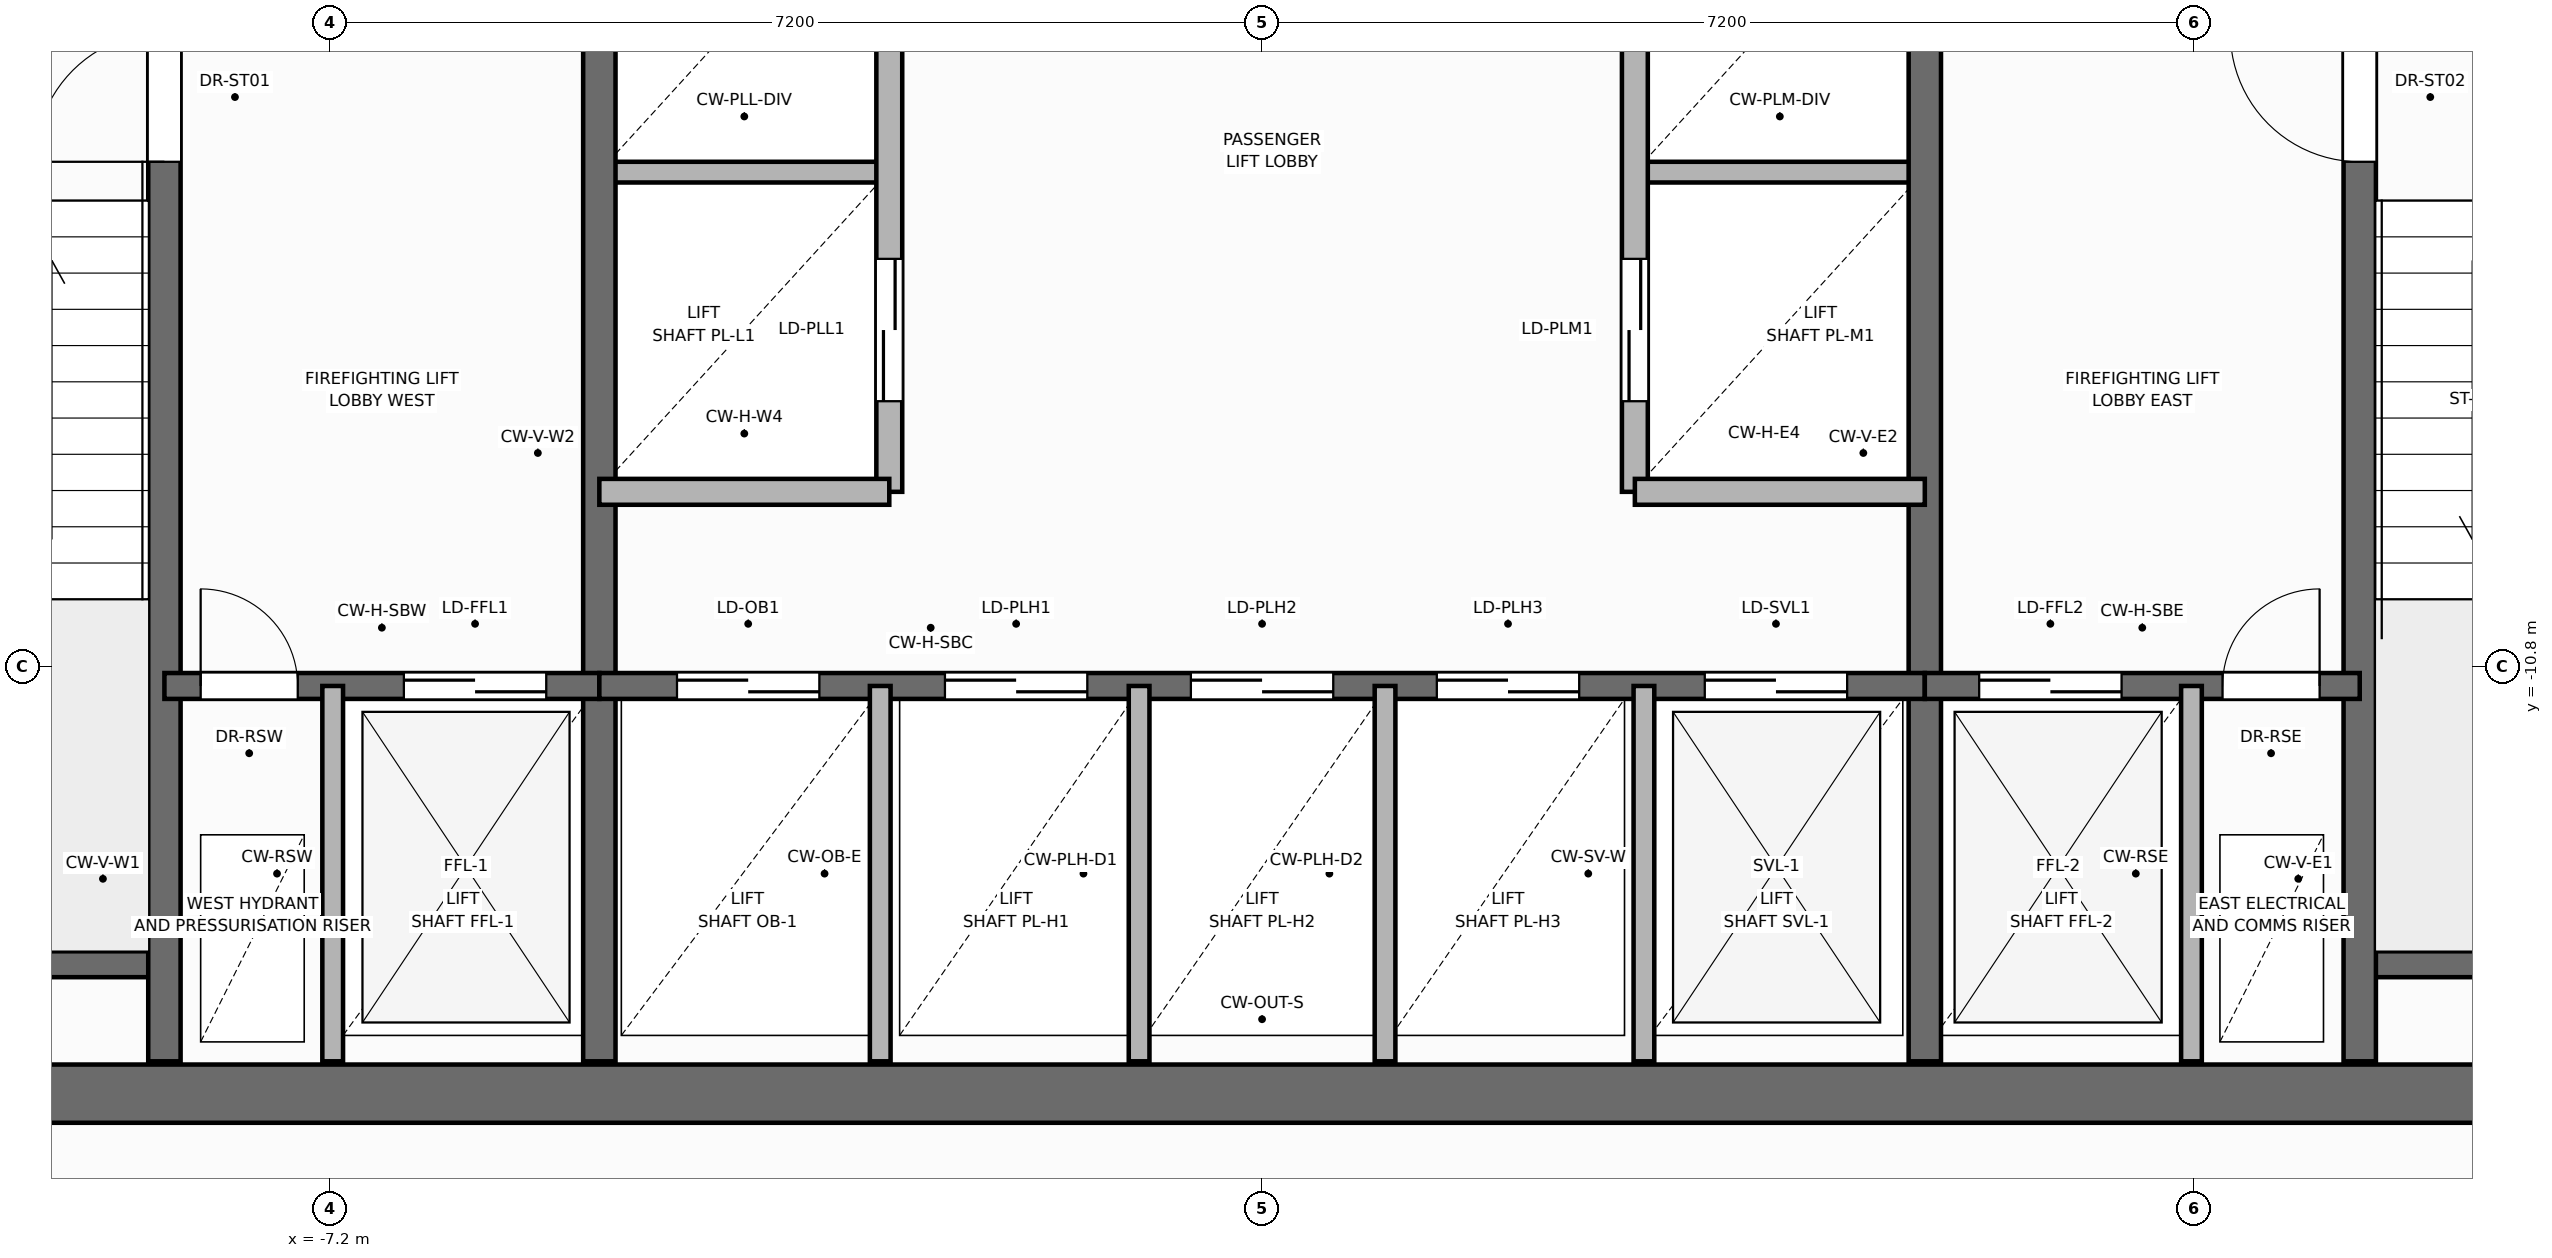
"""IFC4 building model, lengths in metres.
Left out: names, types, materials, properties, quantities, classifications, styles, units other than length and angle.
Written with IfcOpenShell. Run it as: python <this file> out.ifc"""

import sys

from ifc_helpers import new_model, si_unit, direction, frame, frame_2d, origin, place, context, subcontext, project, spatial, rectangle, extrude, element, fill, save


model = new_model("IFC4")
c1 = context("Model", 3, precision=1e-05, world=origin(), true_north=direction((0.0, 1.0)))
c2 = subcontext(c1, "Body", "Model", "MODEL_VIEW")
j1 = project(units=[si_unit("LENGTHUNIT", "METRE"), si_unit("PLANEANGLEUNIT", "RADIAN")], contexts=[c1])
p1 = place(None, origin())
s1 = spatial("IfcSite", under=j1, at=p1, CompositionType="ELEMENT")
p2 = place(p1, origin())
s2 = spatial("IfcBuilding", under=s1, at=p2, CompositionType="ELEMENT")
p3 = place(p2, frame((0.0, 0.0, 14.4)))
s3 = spatial("IfcBuildingStorey", under=s2, at=p3, CompositionType="ELEMENT", Elevation=14.4)
for number, where, z_axis, x_axis in (
    (1, (-5.12, -6.98, 0.0), (0.0, 0.0, 1.0), (1.0, 0.0, 0.0)),
    (2, (2.88, -6.98, 0.0), (0.0, 0.0, 1.0), (1.0, 0.0, 0.0)),
):
    element("IfcWall", number, at=place(p3, frame(where, z_axis=z_axis, x_axis=x_axis)), inside=s3, PredefinedType="PARTITIONING", context=c2, shape_type="SweptSolid", body=[
        extrude(rectangle(XDim=2.24, YDim=0.16, at=frame_2d((1.12, 0.0))), origin(), (0.0, 0.0, 1.0), 4.1),
    ])
p4 = place(p3, frame((-12.65, -14.1, 0.0), z_axis=(0.0, 0.0, 1.0), x_axis=(1.0, 0.0, 0.0)))
e3 = element("IfcWall", 3, at=p4, inside=s3, PredefinedType="SHEAR", context=c2, shape_type="SweptSolid", body=[
    extrude(rectangle(XDim=25.3, YDim=0.45, at=frame_2d((12.65, 0.0))), origin(), (0.0, 0.0, 1.0), 4.5),
])
for number, where, z_axis, x_axis in (
    (4, (-12.35, -13.1, 0.0), (0.0, 0.0, 1.0), (1.0, 0.0, 0.0)),
    (5, (8.48, -13.1, 0.0), (0.0, 0.0, 1.0), (1.0, 0.0, 0.0)),
):
    element("IfcWall", number, at=place(p3, frame(where, z_axis=z_axis, x_axis=x_axis)), inside=s3, PredefinedType="SOLIDWALL", context=c2, shape_type="SweptSolid", body=[
        extrude(rectangle(XDim=3.87, YDim=0.2, at=frame_2d((1.935, 0.0))), origin(), (0.0, 0.0, 1.0), 4.5),
    ])
p5 = place(p3, frame((-8.48, -13.85, 0.0), z_axis=(0.0, 0.0, 1.0), x_axis=(0.0, 1.0, 0.0)))
e6 = element("IfcWall", 6, at=p5, inside=s3, PredefinedType="SHEAR", context=c2, shape_type="SweptSolid", body=[
    extrude(rectangle(XDim=9.4, YDim=0.25, at=frame_2d((4.7, 0.0))), origin(), (0.0, 0.0, 1.0), 4.5),
])
p6 = place(p5, frame((6.95, 0.0, 0.0)))
e7 = element("IfcOpeningElement", 7, at=p6, cuts=e6, PredefinedType="OPENING", context=c2, shape_type="SweptSolid", body=[
    extrude(rectangle(XDim=1.006, YDim=2.104, at=frame_2d((0.5, 1.052))), frame((0.0, 0.135, 0.0), z_axis=(0.0, -1.0, 0.0), x_axis=(1.0, 0.0, 0.0)), (0.0, 0.0, 1.0), 0.27),
])
p7 = place(p3, frame((8.48, -13.85, 0.0), z_axis=(0.0, 0.0, 1.0), x_axis=(0.0, 1.0, 0.0)))
e8 = element("IfcWall", 8, at=p7, inside=s3, PredefinedType="SHEAR", context=c2, shape_type="SweptSolid", body=[
    extrude(rectangle(XDim=9.4, YDim=0.25, at=frame_2d((4.7, 0.0))), origin(), (0.0, 0.0, 1.0), 4.5),
])
p8 = place(p7, frame((6.95, 0.0, 0.0)))
e9 = element("IfcOpeningElement", 9, at=p8, cuts=e8, PredefinedType="OPENING", context=c2, shape_type="SweptSolid", body=[
    extrude(rectangle(XDim=1.006, YDim=2.104, at=frame_2d((0.5, 1.052))), frame((0.0, 0.135, 0.0), z_axis=(0.0, -1.0, 0.0), x_axis=(1.0, 0.0, 0.0)), (0.0, 0.0, 1.0), 0.27),
])
for number, where, z_axis, x_axis in (
    (10, (-5.12, -13.85, 0.0), (0.0, 0.0, 1.0), (0.0, 1.0, 0.0)),
    (11, (5.12, -13.85, 0.0), (0.0, 0.0, 1.0), (0.0, 1.0, 0.0)),
):
    element("IfcWall", number, at=place(p3, frame(where, z_axis=z_axis, x_axis=x_axis)), inside=s3, PredefinedType="SHEAR", context=c2, shape_type="SweptSolid", body=[
        extrude(rectangle(XDim=9.4, YDim=0.25, at=frame_2d((4.7, 0.0))), origin(), (0.0, 0.0, 1.0), 4.5),
    ])
p9 = place(p3, frame((-8.48, -10.95, 0.0), z_axis=(0.0, 0.0, 1.0), x_axis=(1.0, 0.0, 0.0)))
e12 = element("IfcWall", 12, at=p9, inside=s3, PredefinedType="SOLIDWALL", context=c2, shape_type="SweptSolid", body=[
    extrude(rectangle(XDim=3.36, YDim=0.2, at=frame_2d((1.68, 0.0))), origin(), (0.0, 0.0, 1.0), 4.5),
])
p10 = place(p9, frame((0.28, 0.0, 0.0)))
e13 = element("IfcOpeningElement", 13, at=p10, cuts=e12, PredefinedType="OPENING", context=c2, shape_type="SweptSolid", body=[
    extrude(rectangle(XDim=0.756, YDim=2.054, at=frame_2d((0.375, 1.027))), frame((0.0, 0.11, 0.0), z_axis=(0.0, -1.0, 0.0), x_axis=(1.0, 0.0, 0.0)), (0.0, 0.0, 1.0), 0.22),
])
p11 = place(p9, frame((1.85, 0.0, 0.0)))
e14 = element("IfcOpeningElement", 14, at=p11, cuts=e12, PredefinedType="OPENING", context=c2, shape_type="SweptSolid", body=[
    extrude(rectangle(XDim=1.106, YDim=2.104, at=frame_2d((0.55, 1.052))), frame((0.0, 0.11, 0.0), z_axis=(0.0, -1.0, 0.0), x_axis=(1.0, 0.0, 0.0)), (0.0, 0.0, 1.0), 0.22),
])
p12 = place(p3, frame((-5.12, -10.95, 0.0), z_axis=(0.0, 0.0, 1.0), x_axis=(1.0, 0.0, 0.0)))
e15 = element("IfcWall", 15, at=p12, inside=s3, PredefinedType="SOLIDWALL", context=c2, shape_type="SweptSolid", body=[
    extrude(rectangle(XDim=10.24, YDim=0.2, at=frame_2d((5.12, 0.0))), origin(), (0.0, 0.0, 1.0), 4.5),
])
p13 = place(p12, frame((0.6, 0.0, 0.0)))
e16 = element("IfcOpeningElement", 16, at=p13, cuts=e15, PredefinedType="OPENING", context=c2, shape_type="SweptSolid", body=[
    extrude(rectangle(XDim=1.106, YDim=2.104, at=frame_2d((0.55, 1.052))), frame((0.0, 0.11, 0.0), z_axis=(0.0, -1.0, 0.0), x_axis=(1.0, 0.0, 0.0)), (0.0, 0.0, 1.0), 0.22),
])
p14 = place(p12, frame((2.67, 0.0, 0.0)))
e17 = element("IfcOpeningElement", 17, at=p14, cuts=e15, PredefinedType="OPENING", context=c2, shape_type="SweptSolid", body=[
    extrude(rectangle(XDim=1.106, YDim=2.104, at=frame_2d((0.55, 1.052))), frame((0.0, 0.11, 0.0), z_axis=(0.0, -1.0, 0.0), x_axis=(1.0, 0.0, 0.0)), (0.0, 0.0, 1.0), 0.22),
])
p15 = place(p12, frame((4.57, 0.0, 0.0)))
e18 = element("IfcOpeningElement", 18, at=p15, cuts=e15, PredefinedType="OPENING", context=c2, shape_type="SweptSolid", body=[
    extrude(rectangle(XDim=1.106, YDim=2.104, at=frame_2d((0.55, 1.052))), frame((0.0, 0.11, 0.0), z_axis=(0.0, -1.0, 0.0), x_axis=(1.0, 0.0, 0.0)), (0.0, 0.0, 1.0), 0.22),
])
p16 = place(p12, frame((6.47, 0.0, 0.0)))
e19 = element("IfcOpeningElement", 19, at=p16, cuts=e15, PredefinedType="OPENING", context=c2, shape_type="SweptSolid", body=[
    extrude(rectangle(XDim=1.106, YDim=2.104, at=frame_2d((0.55, 1.052))), frame((0.0, 0.11, 0.0), z_axis=(0.0, -1.0, 0.0), x_axis=(1.0, 0.0, 0.0)), (0.0, 0.0, 1.0), 0.22),
])
p17 = place(p12, frame((8.54, 0.0, 0.0)))
e20 = element("IfcOpeningElement", 20, at=p17, cuts=e15, PredefinedType="OPENING", context=c2, shape_type="SweptSolid", body=[
    extrude(rectangle(XDim=1.106, YDim=2.104, at=frame_2d((0.55, 1.052))), frame((0.0, 0.11, 0.0), z_axis=(0.0, -1.0, 0.0), x_axis=(1.0, 0.0, 0.0)), (0.0, 0.0, 1.0), 0.22),
])
p18 = place(p3, frame((5.12, -10.95, 0.0), z_axis=(0.0, 0.0, 1.0), x_axis=(1.0, 0.0, 0.0)))
e21 = element("IfcWall", 21, at=p18, inside=s3, PredefinedType="SOLIDWALL", context=c2, shape_type="SweptSolid", body=[
    extrude(rectangle(XDim=3.36, YDim=0.2, at=frame_2d((1.68, 0.0))), origin(), (0.0, 0.0, 1.0), 4.5),
])
p19 = place(p18, frame((0.42, 0.0, 0.0)))
e22 = element("IfcOpeningElement", 22, at=p19, cuts=e21, PredefinedType="OPENING", context=c2, shape_type="SweptSolid", body=[
    extrude(rectangle(XDim=1.106, YDim=2.104, at=frame_2d((0.55, 1.052))), frame((0.0, 0.11, 0.0), z_axis=(0.0, -1.0, 0.0), x_axis=(1.0, 0.0, 0.0)), (0.0, 0.0, 1.0), 0.22),
])
p20 = place(p18, frame((2.3, 0.0, 0.0)))
e23 = element("IfcOpeningElement", 23, at=p20, cuts=e21, PredefinedType="OPENING", context=c2, shape_type="SweptSolid", body=[
    extrude(rectangle(XDim=0.756, YDim=2.054, at=frame_2d((0.375, 1.027))), frame((0.0, 0.11, 0.0), z_axis=(0.0, -1.0, 0.0), x_axis=(1.0, 0.0, 0.0)), (0.0, 0.0, 1.0), 0.22),
])
for number, where, z_axis, x_axis in (
    (24, (-7.18, -13.85, 0.0), (0.0, 0.0, 1.0), (0.0, 1.0, 0.0)),
    (25, (7.18, -13.85, 0.0), (0.0, 0.0, 1.0), (0.0, 1.0, 0.0)),
    (26, (-2.95, -13.85, 0.0), (0.0, 0.0, 1.0), (0.0, 1.0, 0.0)),
    (27, (2.95, -13.85, 0.0), (0.0, 0.0, 1.0), (0.0, 1.0, 0.0)),
):
    element("IfcWall", number, at=place(p3, frame(where, z_axis=z_axis, x_axis=x_axis)), inside=s3, PredefinedType="PARTITIONING", context=c2, shape_type="SweptSolid", body=[
        extrude(rectangle(XDim=2.9, YDim=0.16, at=frame_2d((1.45, 0.0))), origin(), (0.0, 0.0, 1.0), 3.125),
    ])
p21 = place(p3, frame((-2.88, -9.45, 0.0), z_axis=(0.0, 0.0, 1.0), x_axis=(0.0, 1.0, 0.0)))
e28 = element("IfcWall", 28, at=p21, inside=s3, PredefinedType="SOLIDWALL", context=c2, shape_type="SweptSolid", body=[
    extrude(rectangle(XDim=5.0, YDim=0.2, at=frame_2d((2.5, 0.0))), origin(), (0.0, 0.0, 1.0), 4.1),
])
p22 = place(p21, frame((0.7, 0.0, 0.0)))
e29 = element("IfcOpeningElement", 29, at=p22, cuts=e28, PredefinedType="OPENING", context=c2, shape_type="SweptSolid", body=[
    extrude(rectangle(XDim=1.106, YDim=2.104, at=frame_2d((0.55, 1.052))), frame((0.0, 0.11, 0.0), z_axis=(0.0, -1.0, 0.0), x_axis=(1.0, 0.0, 0.0)), (0.0, 0.0, 1.0), 0.22),
])
p23 = place(p3, frame((-5.12, -9.45, 0.0), z_axis=(0.0, 0.0, 1.0), x_axis=(1.0, 0.0, 0.0)))
e30 = element("IfcWall", 30, at=p23, inside=s3, PredefinedType="SOLIDWALL", context=c2, shape_type="SweptSolid", body=[
    extrude(rectangle(XDim=2.24, YDim=0.2, at=frame_2d((1.12, 0.0))), origin(), (0.0, 0.0, 1.0), 4.1),
])
p24 = place(p3, frame((2.88, -9.45, 0.0), z_axis=(0.0, 0.0, 1.0), x_axis=(0.0, 1.0, 0.0)))
e31 = element("IfcWall", 31, at=p24, inside=s3, PredefinedType="SOLIDWALL", context=c2, shape_type="SweptSolid", body=[
    extrude(rectangle(XDim=5.0, YDim=0.2, at=frame_2d((2.5, 0.0))), origin(), (0.0, 0.0, 1.0), 4.1),
])
p25 = place(p24, frame((0.7, 0.0, 0.0)))
e32 = element("IfcOpeningElement", 32, at=p25, cuts=e31, PredefinedType="OPENING", context=c2, shape_type="SweptSolid", body=[
    extrude(rectangle(XDim=1.106, YDim=2.104, at=frame_2d((0.55, 1.052))), frame((0.0, 0.11, 0.0), z_axis=(0.0, -1.0, 0.0), x_axis=(1.0, 0.0, 0.0)), (0.0, 0.0, 1.0), 0.22),
])
p26 = place(p3, frame((2.88, -9.45, 0.0), z_axis=(0.0, 0.0, 1.0), x_axis=(1.0, 0.0, 0.0)))
e33 = element("IfcWall", 33, at=p26, inside=s3, PredefinedType="SOLIDWALL", context=c2, shape_type="SweptSolid", body=[
    extrude(rectangle(XDim=2.24, YDim=0.2, at=frame_2d((1.12, 0.0))), origin(), (0.0, 0.0, 1.0), 4.1),
])
for number, where, z_axis, x_axis in (
    (34, (-0.95, -13.85, 0.0), (0.0, 0.0, 1.0), (0.0, 1.0, 0.0)),
    (35, (0.95, -13.85, 0.0), (0.0, 0.0, 1.0), (0.0, 1.0, 0.0)),
):
    element("IfcWall", number, at=place(p3, frame(where, z_axis=z_axis, x_axis=x_axis)), inside=s3, PredefinedType="PARTITIONING", context=c2, shape_type="SweptSolid", body=[
        extrude(rectangle(XDim=2.9, YDim=0.16, at=frame_2d((1.45, 0.0))), origin(), (0.0, 0.0, 1.0), 3.125),
    ])
p27 = place(p22, origin())
e36 = element("IfcDoor", 36, at=p27, inside=s3, OperationType="DOUBLE_DOOR_SLIDING", PredefinedType="DOOR", context=c2, shape_type="SweptSolid", body=[
    extrude(rectangle(XDim=1.1, YDim=2.1, at=frame_2d((0.55, 1.05))), frame((0.0, 0.025, 0.0), z_axis=(0.0, -1.0, 0.0), x_axis=(1.0, 0.0, 0.0)), (0.0, 0.0, 1.0), 0.05),
])
fill(e29, e36)
p28 = place(p25, origin())
e37 = element("IfcDoor", 37, at=p28, inside=s3, OperationType="DOUBLE_DOOR_SLIDING", PredefinedType="DOOR", context=c2, shape_type="SweptSolid", body=[
    extrude(rectangle(XDim=1.1, YDim=2.1, at=frame_2d((0.55, 1.05))), frame((0.0, 0.025, 0.0), z_axis=(0.0, -1.0, 0.0), x_axis=(1.0, 0.0, 0.0)), (0.0, 0.0, 1.0), 0.05),
])
fill(e32, e37)
p29 = place(p6, origin())
e38 = element("IfcDoor", 38, at=p29, inside=s3, OperationType="SINGLE_SWING_LEFT", PredefinedType="DOOR", context=c2, shape_type="SweptSolid", body=[
    extrude(rectangle(XDim=1.0, YDim=2.1, at=frame_2d((0.5, 1.05))), frame((0.0, 0.025, 0.0), z_axis=(0.0, -1.0, 0.0), x_axis=(1.0, 0.0, 0.0)), (0.0, 0.0, 1.0), 0.05),
])
fill(e7, e38)
p30 = place(p8, origin())
e39 = element("IfcDoor", 39, at=p30, inside=s3, OperationType="SINGLE_SWING_RIGHT", PredefinedType="DOOR", context=c2, shape_type="SweptSolid", body=[
    extrude(rectangle(XDim=1.0, YDim=2.1, at=frame_2d((0.5, 1.05))), frame((0.0, 0.025, 0.0), z_axis=(0.0, -1.0, 0.0), x_axis=(1.0, 0.0, 0.0)), (0.0, 0.0, 1.0), 0.05),
])
fill(e9, e39)
p31 = place(p10, origin())
e40 = element("IfcDoor", 40, at=p31, inside=s3, OperationType="SINGLE_SWING_LEFT", PredefinedType="DOOR", context=c2, shape_type="SweptSolid", body=[
    extrude(rectangle(XDim=0.75, YDim=2.05, at=frame_2d((0.375, 1.025))), frame((0.0, 0.025, 0.0), z_axis=(0.0, -1.0, 0.0), x_axis=(1.0, 0.0, 0.0)), (0.0, 0.0, 1.0), 0.05),
])
fill(e13, e40)
p32 = place(p11, origin())
e41 = element("IfcDoor", 41, at=p32, inside=s3, OperationType="DOUBLE_DOOR_SLIDING", PredefinedType="DOOR", context=c2, shape_type="SweptSolid", body=[
    extrude(rectangle(XDim=1.1, YDim=2.1, at=frame_2d((0.55, 1.05))), frame((0.0, 0.025, 0.0), z_axis=(0.0, -1.0, 0.0), x_axis=(1.0, 0.0, 0.0)), (0.0, 0.0, 1.0), 0.05),
])
fill(e14, e41)
p33 = place(p19, origin())
e42 = element("IfcDoor", 42, at=p33, inside=s3, OperationType="DOUBLE_DOOR_SLIDING", PredefinedType="DOOR", context=c2, shape_type="SweptSolid", body=[
    extrude(rectangle(XDim=1.1, YDim=2.1, at=frame_2d((0.55, 1.05))), frame((0.0, 0.025, 0.0), z_axis=(0.0, -1.0, 0.0), x_axis=(1.0, 0.0, 0.0)), (0.0, 0.0, 1.0), 0.05),
])
fill(e22, e42)
p34 = place(p20, origin())
e43 = element("IfcDoor", 43, at=p34, inside=s3, OperationType="SINGLE_SWING_RIGHT", PredefinedType="DOOR", context=c2, shape_type="SweptSolid", body=[
    extrude(rectangle(XDim=0.75, YDim=2.05, at=frame_2d((0.375, 1.025))), frame((0.0, 0.025, 0.0), z_axis=(0.0, -1.0, 0.0), x_axis=(1.0, 0.0, 0.0)), (0.0, 0.0, 1.0), 0.05),
])
fill(e23, e43)
p35 = place(p13, origin())
e44 = element("IfcDoor", 44, at=p35, inside=s3, OperationType="DOUBLE_DOOR_SLIDING", PredefinedType="DOOR", context=c2, shape_type="SweptSolid", body=[
    extrude(rectangle(XDim=1.1, YDim=2.1, at=frame_2d((0.55, 1.05))), frame((0.0, 0.025, 0.0), z_axis=(0.0, -1.0, 0.0), x_axis=(1.0, 0.0, 0.0)), (0.0, 0.0, 1.0), 0.05),
])
fill(e16, e44)
p36 = place(p14, origin())
e45 = element("IfcDoor", 45, at=p36, inside=s3, OperationType="DOUBLE_DOOR_SLIDING", PredefinedType="DOOR", context=c2, shape_type="SweptSolid", body=[
    extrude(rectangle(XDim=1.1, YDim=2.1, at=frame_2d((0.55, 1.05))), frame((0.0, 0.025, 0.0), z_axis=(0.0, -1.0, 0.0), x_axis=(1.0, 0.0, 0.0)), (0.0, 0.0, 1.0), 0.05),
])
fill(e17, e45)
p37 = place(p15, origin())
e46 = element("IfcDoor", 46, at=p37, inside=s3, OperationType="DOUBLE_DOOR_SLIDING", PredefinedType="DOOR", context=c2, shape_type="SweptSolid", body=[
    extrude(rectangle(XDim=1.1, YDim=2.1, at=frame_2d((0.55, 1.05))), frame((0.0, 0.025, 0.0), z_axis=(0.0, -1.0, 0.0), x_axis=(1.0, 0.0, 0.0)), (0.0, 0.0, 1.0), 0.05),
])
fill(e18, e46)
p38 = place(p16, origin())
e47 = element("IfcDoor", 47, at=p38, inside=s3, OperationType="DOUBLE_DOOR_SLIDING", PredefinedType="DOOR", context=c2, shape_type="SweptSolid", body=[
    extrude(rectangle(XDim=1.1, YDim=2.1, at=frame_2d((0.55, 1.05))), frame((0.0, 0.025, 0.0), z_axis=(0.0, -1.0, 0.0), x_axis=(1.0, 0.0, 0.0)), (0.0, 0.0, 1.0), 0.05),
])
fill(e19, e47)
p39 = place(p17, origin())
e48 = element("IfcDoor", 48, at=p39, inside=s3, OperationType="DOUBLE_DOOR_SLIDING", PredefinedType="DOOR", context=c2, shape_type="SweptSolid", body=[
    extrude(rectangle(XDim=1.1, YDim=2.1, at=frame_2d((0.55, 1.05))), frame((0.0, 0.025, 0.0), z_axis=(0.0, -1.0, 0.0), x_axis=(1.0, 0.0, 0.0)), (0.0, 0.0, 1.0), 0.05),
])
fill(e20, e48)
save(model, sys.argv[1])
